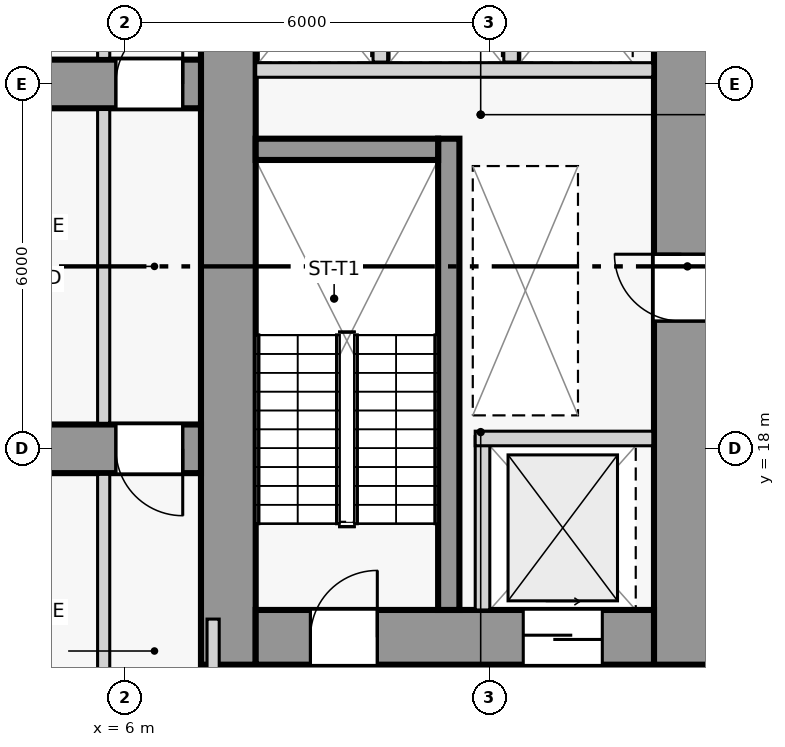
"""IFC4 building model, lengths in metres.
Left out: names, types, materials, properties, quantities, classifications, styles, units other than length and angle.
Written with IfcOpenShell. Run it as: python <this file> out.ifc"""

import sys

from ifc_helpers import new_model, si_unit, direction, frame, frame_2d, origin, place, context, subcontext, project, spatial, rectangle, extrude, source, transform, mapped, element, fill, save


model = new_model("IFC4")
c1 = context("Model", 3, precision=1e-05, world=origin(), true_north=direction((0.0, 1.0)))
c2 = subcontext(c1, "Body", "Model", "MODEL_VIEW")
j1 = project(units=[si_unit("LENGTHUNIT", "METRE"), si_unit("PLANEANGLEUNIT", "RADIAN")], contexts=[c1])
p1 = place(None, origin())
s1 = spatial("IfcSite", under=j1, at=p1, CompositionType="ELEMENT")
p2 = place(p1, origin())
s2 = spatial("IfcBuilding", under=s1, at=p2, CompositionType="ELEMENT")
p3 = place(p2, frame((0.0, 0.0, 76.5)))
s3 = spatial("IfcBuildingStorey", under=s2, at=p3, CompositionType="ELEMENT", Elevation=76.5)
p4 = place(p3, frame((7.7, 14.45, 0.0), z_axis=(0.0, 0.0, 1.0), x_axis=(0.0, 1.0, 0.0)))
e1 = element("IfcWall", 1, at=p4, inside=s3, PredefinedType="SHEAR", context=c2, shape_type="SweptSolid", body=[
    extrude(rectangle(XDim=13.15, YDim=0.9, at=frame_2d((6.575, 0.0))), origin(), (0.0, 0.0, 1.0), 7.2),
])
p5 = place(p3, frame((15.15, 14.45, 0.0), z_axis=(0.0, 0.0, 1.0), x_axis=(0.0, 1.0, 0.0)))
e2 = element("IfcWall", 2, at=p5, inside=s3, PredefinedType="SHEAR", context=c2, shape_type="SweptSolid", body=[
    extrude(rectangle(XDim=13.15, YDim=0.9, at=frame_2d((6.575, 0.0))), origin(), (0.0, 0.0, 1.0), 7.2),
])
p6 = place(p5, frame((5.65, 0.0, 0.0)))
e3 = element("IfcOpeningElement", 3, at=p6, cuts=e2, PredefinedType="OPENING", context=c2, shape_type="SweptSolid", body=[
    extrude(rectangle(XDim=1.1, YDim=2.2, at=frame_2d((0.55, 1.1))), frame((0.0, 0.46, 0.0), z_axis=(0.0, -1.0, 0.0), x_axis=(1.0, 0.0, 0.0)), (0.0, 0.0, 1.0), 0.92),
])
p7 = place(p3, frame((8.15, 14.9, 0.0), z_axis=(0.0, 0.0, 1.0), x_axis=(1.0, 0.0, 0.0)))
e4 = element("IfcWall", 4, at=p7, inside=s3, PredefinedType="SHEAR", context=c2, shape_type="SweptSolid", body=[
    extrude(rectangle(XDim=6.55, YDim=0.9, at=frame_2d((3.275, 0.0))), origin(), (0.0, 0.0, 1.0), 7.2),
])
p8 = place(p7, frame((0.9, 0.0, 0.0)))
e5 = element("IfcOpeningElement", 5, at=p8, cuts=e4, PredefinedType="OPENING", context=c2, shape_type="SweptSolid", body=[
    extrude(rectangle(XDim=1.1, YDim=2.2, at=frame_2d((0.55, 1.1))), frame((0.0, 0.46, 0.0), z_axis=(0.0, -1.0, 0.0), x_axis=(1.0, 0.0, 0.0)), (0.0, 0.0, 1.0), 0.92),
])
p9 = place(p7, frame((4.4, 0.0, 0.0)))
e6 = element("IfcOpeningElement", 6, at=p9, cuts=e4, PredefinedType="OPENING", context=c2, shape_type="SweptSolid", body=[
    extrude(rectangle(XDim=1.3, YDim=2.2, at=frame_2d((0.65, 1.1))), frame((0.0, 0.46, 0.0), z_axis=(0.0, -1.0, 0.0), x_axis=(1.0, 0.0, 0.0)), (0.0, 0.0, 1.0), 0.92),
])
p10 = place(p3, frame((11.325, 15.35, 0.0), z_axis=(0.0, 0.0, 1.0), x_axis=(0.0, 1.0, 0.0)))
e7 = element("IfcWall", 7, at=p10, inside=s3, PredefinedType="SHEAR", context=c2, shape_type="SweptSolid", body=[
    extrude(rectangle(XDim=7.75, YDim=0.35, at=frame_2d((3.875, 0.0))), origin(), (0.0, 0.0, 1.0), 7.2),
])
p11 = place(p3, frame((8.15, 22.925, 0.0), z_axis=(0.0, 0.0, 1.0), x_axis=(1.0, 0.0, 0.0)))
e8 = element("IfcWall", 8, at=p11, inside=s3, PredefinedType="SHEAR", context=c2, shape_type="SweptSolid", body=[
    extrude(rectangle(XDim=3.0, YDim=0.35, at=frame_2d((1.5, 0.0))), origin(), (0.0, 0.0, 1.0), 7.2),
])
p12 = place(p3, frame((0.65, 18.0, 0.0), z_axis=(0.0, 0.0, 1.0), x_axis=(1.0, 0.0, 0.0)))
e9 = element("IfcWall", 9, at=p12, inside=s3, PredefinedType="SOLIDWALL", context=c2, shape_type="SweptSolid", body=[
    extrude(rectangle(XDim=6.6, YDim=0.8, at=frame_2d((3.3, 0.0))), origin(), (0.0, 0.0, 1.0), 6.55),
])
p13 = place(p12, frame((5.2, 0.0, 0.0)))
e10 = element("IfcOpeningElement", 10, at=p13, cuts=e9, PredefinedType="OPENING", context=c2, shape_type="SweptSolid", body=[
    extrude(rectangle(XDim=1.1, YDim=2.2, at=frame_2d((0.55, 1.1))), frame((0.0, 0.41, 0.0), z_axis=(0.0, -1.0, 0.0), x_axis=(1.0, 0.0, 0.0)), (0.0, 0.0, 1.0), 0.82),
])
p14 = place(p3, frame((0.65, 24.0, 0.0), z_axis=(0.0, 0.0, 1.0), x_axis=(1.0, 0.0, 0.0)))
e11 = element("IfcWall", 11, at=p14, inside=s3, PredefinedType="SOLIDWALL", context=c2, shape_type="SweptSolid", body=[
    extrude(rectangle(XDim=6.6, YDim=0.8, at=frame_2d((3.3, 0.0))), origin(), (0.0, 0.0, 1.0), 6.55),
])
p15 = place(p14, frame((5.2, 0.0, 0.0)))
e12 = element("IfcOpeningElement", 12, at=p15, cuts=e11, PredefinedType="OPENING", context=c2, shape_type="SweptSolid", body=[
    extrude(rectangle(XDim=1.1, YDim=2.2, at=frame_2d((0.55, 1.1))), frame((0.0, 0.41, 0.0), z_axis=(0.0, -1.0, 0.0), x_axis=(1.0, 0.0, 0.0)), (0.0, 0.0, 1.0), 0.82),
])
p16 = place(p3, frame((11.88, 15.35, 0.0), z_axis=(0.0, 0.0, 1.0), x_axis=(0.0, 1.0, 0.0)))
e13 = element("IfcWall", 13, at=p16, inside=s3, PredefinedType="PARTITIONING", context=c2, shape_type="SweptSolid", body=[
    extrude(rectangle(XDim=2.85, YDim=0.24, at=frame_2d((1.425, 0.0))), origin(), (0.0, 0.0, 1.0), 6.55),
])
p17 = place(p3, frame((11.76, 18.17, 0.0), z_axis=(0.0, 0.0, 1.0), x_axis=(1.0, 0.0, 0.0)))
e14 = element("IfcWall", 14, at=p17, inside=s3, PredefinedType="PARTITIONING", context=c2, shape_type="SweptSolid", body=[
    extrude(rectangle(XDim=2.92, YDim=0.24, at=frame_2d((1.46, 0.0))), origin(), (0.0, 0.0, 1.0), 6.55),
])
for number, where, z_axis, x_axis in (
    (15, (8.05, 11.47, 0.0), (0.0, 0.0, 1.0), (0.0, 1.0, 0.0)),
    (16, (15.15, 11.47, 0.0), (0.0, 0.0, 1.0), (0.0, 1.0, 0.0)),
):
    element("IfcWall", number, at=place(p3, frame(where, z_axis=z_axis, x_axis=x_axis)), inside=s3, PredefinedType="PARTITIONING", context=c2, shape_type="SweptSolid", body=[
        extrude(rectangle(XDim=2.96, YDim=0.2, at=frame_2d((1.48, 0.0))), origin(), (0.0, 0.0, 1.0), 6.55),
    ])
p18 = place(p3, frame((8.15, 24.23, 0.0), z_axis=(0.0, 0.0, 1.0), x_axis=(1.0, 0.0, 0.0)))
e17 = element("IfcWall", 17, at=p18, inside=s3, PredefinedType="PARTITIONING", context=c2, shape_type="SweptSolid", body=[
    extrude(rectangle(XDim=6.53, YDim=0.24, at=frame_2d((3.265, 0.0))), origin(), (0.0, 0.0, 1.0), 6.55),
])
for number, where, z_axis, x_axis in (
    (18, (10.2, 24.36, 0.0), (0.0, 0.0, 1.0), (0.0, 1.0, 0.0)),
    (19, (12.35, 24.36, 0.0), (0.0, 0.0, 1.0), (0.0, 1.0, 0.0)),
):
    element("IfcWall", number, at=place(p3, frame(where, z_axis=z_axis, x_axis=x_axis)), inside=s3, PredefinedType="PARTITIONING", context=c2, shape_type="SweptSolid", body=[
        extrude(rectangle(XDim=2.32, YDim=0.24, at=frame_2d((1.16, 0.0))), origin(), (0.0, 0.0, 1.0), 6.55),
    ])
p19 = place(p3, frame((5.65, 11.35, 0.0), z_axis=(0.0, 0.0, 1.0), x_axis=(0.0, 1.0, 0.0)))
e20 = element("IfcWall", 20, at=p19, inside=s3, PredefinedType="PARTITIONING", context=c2, shape_type="SweptSolid", body=[
    extrude(rectangle(XDim=6.23, YDim=0.2, at=frame_2d((3.115, 0.0))), origin(), (0.0, 0.0, 1.0), 4.95),
])
p20 = place(p3, frame((5.65, 18.42, 0.0), z_axis=(0.0, 0.0, 1.0), x_axis=(0.0, 1.0, 0.0)))
e21 = element("IfcWall", 21, at=p20, inside=s3, PredefinedType="PARTITIONING", context=c2, shape_type="SweptSolid", body=[
    extrude(rectangle(XDim=5.16, YDim=0.2, at=frame_2d((2.58, 0.0))), origin(), (0.0, 0.0, 1.0), 6.55),
])
p21 = place(p3, frame((5.65, 24.42, 0.0), z_axis=(0.0, 0.0, 1.0), x_axis=(0.0, 1.0, 0.0)))
e22 = element("IfcWall", 22, at=p21, inside=s3, PredefinedType="PARTITIONING", context=c2, shape_type="SweptSolid", body=[
    extrude(rectangle(XDim=8.08, YDim=0.2, at=frame_2d((4.04, 0.0))), origin(), (0.0, 0.0, 1.0), 4.95),
])
p22 = place(p3, frame((7.45, 11.35, 0.0), z_axis=(0.0, 0.0, 1.0), x_axis=(0.0, 1.0, 0.0)))
e23 = element("IfcWall", 23, at=p22, inside=s3, PredefinedType="PARTITIONING", context=c2, shape_type="SweptSolid", body=[
    extrude(rectangle(XDim=3.85, YDim=0.2, at=frame_2d((1.925, 0.0))), origin(), (0.0, 0.0, 1.0), 6.55),
])
m1 = source(origin(), c2, "Body", "SweptSolid", [
    extrude(rectangle(XDim=1.1, YDim=2.2, at=frame_2d((0.55, 1.1))), frame((0.0, 0.025, 0.0), z_axis=(0.0, -1.0, 0.0), x_axis=(1.0, 0.0, 0.0)), (0.0, 0.0, 1.0), 0.05),
])
p23 = place(p8, origin())
e24 = element("IfcDoor", 24, at=p23, inside=s3, OperationType="SINGLE_SWING_RIGHT", PredefinedType="DOOR", context=c2, shape_type="MappedRepresentation", body=[
    mapped(m1, transform((0.0, 0.0, 0.0), scale=1.0)),
])
fill(e5, e24)
m2 = source(origin(), c2, "Body", "SweptSolid", [
    extrude(rectangle(XDim=1.3, YDim=2.2, at=frame_2d((0.65, 1.1))), frame((0.0, 0.025, 0.0), z_axis=(0.0, -1.0, 0.0), x_axis=(1.0, 0.0, 0.0)), (0.0, 0.0, 1.0), 0.05),
])
p24 = place(p9, origin())
e25 = element("IfcDoor", 25, at=p24, inside=s3, OperationType="SLIDING_TO_RIGHT", PredefinedType="DOOR", context=c2, shape_type="MappedRepresentation", body=[
    mapped(m2, transform((0.0, 0.0, 0.0), scale=1.0)),
])
fill(e6, e25)
p25 = place(p6, origin())
e26 = element("IfcDoor", 26, at=p25, inside=s3, OperationType="SINGLE_SWING_RIGHT", PredefinedType="DOOR", context=c2, shape_type="MappedRepresentation", body=[
    mapped(m1, transform((0.0, 0.0, 0.0), scale=1.0)),
])
fill(e3, e26)
p26 = place(p13, frame((1.1, 0.0, 0.0), z_axis=(0.0, 0.0, 1.0), x_axis=(-1.0, 0.0, 0.0)))
e27 = element("IfcDoor", 27, at=p26, inside=s3, OperationType="SINGLE_SWING_LEFT", PredefinedType="DOOR", context=c2, shape_type="MappedRepresentation", body=[
    mapped(m1, transform((0.0, 0.0, 0.0), scale=1.0)),
])
fill(e10, e27)
p27 = place(p15, origin())
e28 = element("IfcDoor", 28, at=p27, inside=s3, OperationType="SINGLE_SWING_RIGHT", PredefinedType="DOOR", context=c2, shape_type="MappedRepresentation", body=[
    mapped(m1, transform((0.0, 0.0, 0.0), scale=1.0)),
])
fill(e12, e28)
save(model, sys.argv[1])
